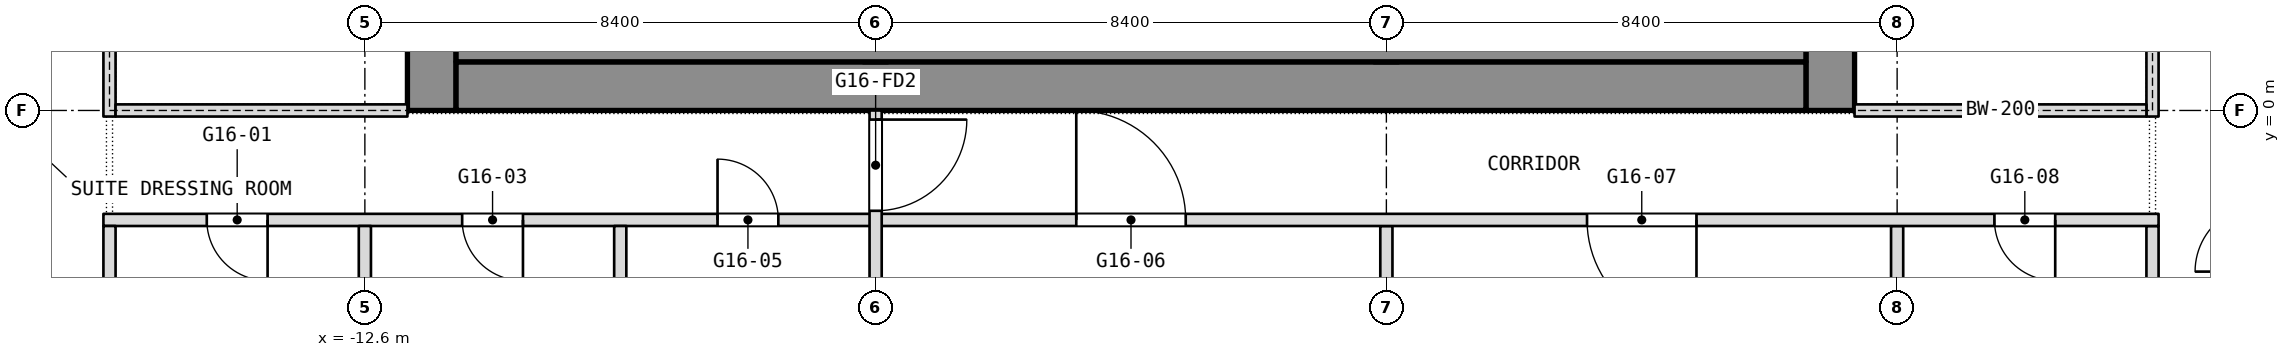
"""IFC4 building model, lengths in metres.
Left out: names, types, materials, properties, quantities, classifications, styles, units other than length and angle.
Written with IfcOpenShell. Run it as: python <this file> out.ifc"""

import sys

from ifc_helpers import new_model, si_unit, direction, frame, frame_2d, origin, place, context, subcontext, project, spatial, rectangle, extrude, element, fill, save


model = new_model("IFC4")
c1 = context("Model", 3, precision=1e-05, world=origin(), true_north=direction((0.0, 1.0)))
c2 = subcontext(c1, "Body", "Model", "MODEL_VIEW")
j1 = project(units=[si_unit("LENGTHUNIT", "METRE"), si_unit("PLANEANGLEUNIT", "RADIAN")], contexts=[c1])
p1 = place(None, origin())
s1 = spatial("IfcSite", under=j1, at=p1, CompositionType="ELEMENT")
p2 = place(p1, origin())
s2 = spatial("IfcBuilding", under=s1, at=p2, CompositionType="ELEMENT")
p3 = place(p2, frame((0.0, 0.0, 198.5)))
s3 = spatial("IfcBuildingStorey", under=s2, at=p3, CompositionType="ELEMENT", Elevation=198.5)
p4 = place(p3, frame((11.5, 0.0, 0.0), z_axis=(0.0, 0.0, 1.0), x_axis=(0.0, 1.0, 0.0)))
e1 = element("IfcWall", 1, at=p4, inside=s3, PredefinedType="SHEAR", context=c2, shape_type="SweptSolid", body=[
    extrude(rectangle(XDim=16.8, YDim=0.8, at=frame_2d((8.4, 0.0))), origin(), (0.0, 0.0, 1.0), 3.6),
])
p5 = place(p4, frame((2.3, 0.0, 0.0)))
e2 = element("IfcOpeningElement", 2, at=p5, cuts=e1, PredefinedType="OPENING", context=c2, shape_type="SweptSolid", body=[
    extrude(rectangle(XDim=1.1, YDim=2.1, at=frame_2d((0.55, 1.05))), frame((0.0, 0.4, 0.0), z_axis=(0.0, -1.0, 0.0), x_axis=(1.0, 0.0, 0.0)), (0.0, 0.0, 1.0), 0.8),
])
p6 = place(p4, frame((4.85, 0.0, 0.0)))
e3 = element("IfcOpeningElement", 3, at=p6, cuts=e1, PredefinedType="OPENING", context=c2, shape_type="SweptSolid", body=[
    extrude(rectangle(XDim=1.1, YDim=2.1, at=frame_2d((0.55, 1.05))), frame((0.0, 0.4, 0.0), z_axis=(0.0, -1.0, 0.0), x_axis=(1.0, 0.0, 0.0)), (0.0, 0.0, 1.0), 0.8),
])
p7 = place(p4, frame((6.825, 0.0, 0.0)))
e4 = element("IfcOpeningElement", 4, at=p7, cuts=e1, PredefinedType="OPENING", context=c2, shape_type="SweptSolid", body=[
    extrude(rectangle(XDim=1.2, YDim=2.1, at=frame_2d((0.6, 1.05))), frame((0.0, 0.4, 0.0), z_axis=(0.0, -1.0, 0.0), x_axis=(1.0, 0.0, 0.0)), (0.0, 0.0, 1.0), 0.8),
])
p8 = place(p4, frame((13.4, 0.0, 0.0)))
e5 = element("IfcOpeningElement", 5, at=p8, cuts=e1, PredefinedType="OPENING", context=c2, shape_type="SweptSolid", body=[
    extrude(rectangle(XDim=1.1, YDim=2.1, at=frame_2d((0.55, 1.05))), frame((0.0, 0.4, 0.0), z_axis=(0.0, -1.0, 0.0), x_axis=(1.0, 0.0, 0.0)), (0.0, 0.0, 1.0), 0.8),
])
p9 = place(p4, frame((10.85, 0.0, 0.0)))
e6 = element("IfcOpeningElement", 6, at=p9, cuts=e1, PredefinedType="OPENING", context=c2, shape_type="SweptSolid", body=[
    extrude(rectangle(XDim=1.1, YDim=2.1, at=frame_2d((0.55, 1.05))), frame((0.0, 0.4, 0.0), z_axis=(0.0, -1.0, 0.0), x_axis=(1.0, 0.0, 0.0)), (0.0, 0.0, 1.0), 0.8),
])
p10 = place(p4, frame((8.775, 0.0, 0.0)))
e7 = element("IfcOpeningElement", 7, at=p10, cuts=e1, PredefinedType="OPENING", context=c2, shape_type="SweptSolid", body=[
    extrude(rectangle(XDim=1.2, YDim=2.1, at=frame_2d((0.6, 1.05))), frame((0.0, 0.4, 0.0), z_axis=(0.0, -1.0, 0.0), x_axis=(1.0, 0.0, 0.0)), (0.0, 0.0, 1.0), 0.8),
])
p11 = place(p3, frame((-11.5, 0.0, 0.0), z_axis=(0.0, 0.0, 1.0), x_axis=(0.0, 1.0, 0.0)))
e8 = element("IfcWall", 8, at=p11, inside=s3, PredefinedType="SHEAR", context=c2, shape_type="SweptSolid", body=[
    extrude(rectangle(XDim=16.8, YDim=0.8, at=frame_2d((8.4, 0.0))), origin(), (0.0, 0.0, 1.0), 3.6),
])
p12 = place(p11, frame((1.837, 0.0, 0.0)))
e9 = element("IfcOpeningElement", 9, at=p12, cuts=e8, PredefinedType="OPENING", context=c2, shape_type="SweptSolid", body=[
    extrude(rectangle(XDim=0.9, YDim=2.1, at=frame_2d((0.45, 1.05))), frame((0.0, 0.4, 0.0), z_axis=(0.0, -1.0, 0.0), x_axis=(1.0, 0.0, 0.0)), (0.0, 0.0, 1.0), 0.8),
])
p13 = place(p11, frame((4.462, 0.0, 0.0)))
e10 = element("IfcOpeningElement", 10, at=p13, cuts=e8, PredefinedType="OPENING", context=c2, shape_type="SweptSolid", body=[
    extrude(rectangle(XDim=0.9, YDim=2.1, at=frame_2d((0.45, 1.05))), frame((0.0, 0.4, 0.0), z_axis=(0.0, -1.0, 0.0), x_axis=(1.0, 0.0, 0.0)), (0.0, 0.0, 1.0), 0.8),
])
p14 = place(p11, frame((6.825, 0.0, 0.0)))
e11 = element("IfcOpeningElement", 11, at=p14, cuts=e8, PredefinedType="OPENING", context=c2, shape_type="SweptSolid", body=[
    extrude(rectangle(XDim=1.2, YDim=2.1, at=frame_2d((0.6, 1.05))), frame((0.0, 0.4, 0.0), z_axis=(0.0, -1.0, 0.0), x_axis=(1.0, 0.0, 0.0)), (0.0, 0.0, 1.0), 0.8),
])
p15 = place(p11, frame((12.3, 0.0, 0.0)))
e12 = element("IfcOpeningElement", 12, at=p15, cuts=e8, PredefinedType="OPENING", context=c2, shape_type="SweptSolid", body=[
    extrude(rectangle(XDim=0.9, YDim=2.1, at=frame_2d((0.45, 1.05))), frame((0.0, 0.4, 0.0), z_axis=(0.0, -1.0, 0.0), x_axis=(1.0, 0.0, 0.0)), (0.0, 0.0, 1.0), 0.8),
])
p16 = place(p11, frame((8.775, 0.0, 0.0)))
e13 = element("IfcOpeningElement", 13, at=p16, cuts=e8, PredefinedType="OPENING", context=c2, shape_type="SweptSolid", body=[
    extrude(rectangle(XDim=1.2, YDim=2.1, at=frame_2d((0.6, 1.05))), frame((0.0, 0.4, 0.0), z_axis=(0.0, -1.0, 0.0), x_axis=(1.0, 0.0, 0.0)), (0.0, 0.0, 1.0), 0.8),
])
p17 = place(p3, frame((-11.1, 0.4, 0.0), z_axis=(0.0, 0.0, 1.0), x_axis=(1.0, 0.0, 0.0)))
e14 = element("IfcWall", 14, at=p17, inside=s3, PredefinedType="SHEAR", context=c2, shape_type="SweptSolid", body=[
    extrude(rectangle(XDim=22.2, YDim=0.8, at=frame_2d((11.1, 0.0))), origin(), (0.0, 0.0, 1.0), 3.6),
])
p18 = place(p3, frame((-4.2, 0.8, 0.0), z_axis=(0.0, 0.0, 1.0), x_axis=(0.0, 1.0, 0.0)))
e15 = element("IfcWall", 15, at=p18, inside=s3, PredefinedType="SHEAR", context=c2, shape_type="SweptSolid", body=[
    extrude(rectangle(XDim=15.2, YDim=0.4, at=frame_2d((7.6, 0.0))), origin(), (0.0, 0.0, 1.0), 3.6),
])
p19 = place(p18, frame((8.5, 0.0, 0.0)))
e16 = element("IfcOpeningElement", 16, at=p19, cuts=e15, PredefinedType="OPENING", context=c2, shape_type="SweptSolid", body=[
    extrude(rectangle(XDim=1.2, YDim=2.1, at=frame_2d((0.6, 1.05))), frame((0.0, 0.2, 0.0), z_axis=(0.0, -1.0, 0.0), x_axis=(1.0, 0.0, 0.0)), (0.0, 0.0, 1.0), 0.4),
])
p20 = place(p3, frame((4.2, 0.8, 0.0), z_axis=(0.0, 0.0, 1.0), x_axis=(0.0, 1.0, 0.0)))
e17 = element("IfcWall", 17, at=p20, inside=s3, PredefinedType="SHEAR", context=c2, shape_type="SweptSolid", body=[
    extrude(rectangle(XDim=15.2, YDim=0.4, at=frame_2d((7.6, 0.0))), origin(), (0.0, 0.0, 1.0), 3.6),
])
p21 = place(p20, frame((5.95, 0.0, 0.0)))
e18 = element("IfcOpeningElement", 18, at=p21, cuts=e17, PredefinedType="OPENING", context=c2, shape_type="SweptSolid", body=[
    extrude(rectangle(XDim=1.2, YDim=2.1, at=frame_2d((0.6, 1.05))), frame((0.0, 0.2, 0.0), z_axis=(0.0, -1.0, 0.0), x_axis=(1.0, 0.0, 0.0)), (0.0, 0.0, 1.0), 0.4),
])
for number, where, z_axis, x_axis in (
    (19, (16.8, -7.8, 0.0), (0.0, 0.0, 1.0), (0.0, 1.0, 0.0)),
    (20, (12.6, -7.8, 0.0), (0.0, 0.0, 1.0), (0.0, 1.0, 0.0)),
):
    element("IfcWall", number, at=place(p3, frame(where, z_axis=z_axis, x_axis=x_axis)), inside=s3, PredefinedType="PARTITIONING", context=c2, shape_type="SweptSolid", body=[
        extrude(rectangle(XDim=5.9, YDim=0.2, at=frame_2d((2.95, 0.0))), origin(), (0.0, 0.0, 1.0), 3.34),
    ])
p22 = place(p3, frame((4.2, -11.6, 0.0), z_axis=(0.0, 0.0, 1.0), x_axis=(0.0, 1.0, 0.0)))
e21 = element("IfcWall", 21, at=p22, inside=s3, PredefinedType="PARTITIONING", context=c2, shape_type="SweptSolid", body=[
    extrude(rectangle(XDim=9.7, YDim=0.2, at=frame_2d((4.85, 0.0))), origin(), (0.0, 0.0, 1.0), 3.34),
])
p23 = place(p3, frame((-16.9, -1.8, 0.0), z_axis=(0.0, 0.0, 1.0), x_axis=(1.0, 0.0, 0.0)))
e22 = element("IfcWall", 22, at=p23, inside=s3, PredefinedType="PARTITIONING", context=c2, shape_type="SweptSolid", body=[
    extrude(rectangle(XDim=33.8, YDim=0.2, at=frame_2d((16.9, 0.0))), origin(), (0.0, 0.0, 1.0), 3.34),
])
p24 = place(p23, frame((1.7, 0.0, 0.0)))
e23 = element("IfcOpeningElement", 23, at=p24, cuts=e22, PredefinedType="OPENING", context=c2, shape_type="SweptSolid", body=[
    extrude(rectangle(XDim=1.0, YDim=2.1, at=frame_2d((0.5, 1.05))), frame((0.0, 0.1, 0.0), z_axis=(0.0, -1.0, 0.0), x_axis=(1.0, 0.0, 0.0)), (0.0, 0.0, 1.0), 0.2),
])
p25 = place(p23, frame((5.9, 0.0, 0.0)))
e24 = element("IfcOpeningElement", 24, at=p25, cuts=e22, PredefinedType="OPENING", context=c2, shape_type="SweptSolid", body=[
    extrude(rectangle(XDim=1.0, YDim=2.1, at=frame_2d((0.5, 1.05))), frame((0.0, 0.1, 0.0), z_axis=(0.0, -1.0, 0.0), x_axis=(1.0, 0.0, 0.0)), (0.0, 0.0, 1.0), 0.2),
])
p26 = place(p23, frame((10.1, 0.0, 0.0)))
e25 = element("IfcOpeningElement", 25, at=p26, cuts=e22, PredefinedType="OPENING", context=c2, shape_type="SweptSolid", body=[
    extrude(rectangle(XDim=1.0, YDim=2.1, at=frame_2d((0.5, 1.05))), frame((0.0, 0.1, 0.0), z_axis=(0.0, -1.0, 0.0), x_axis=(1.0, 0.0, 0.0)), (0.0, 0.0, 1.0), 0.2),
])
p27 = place(p23, frame((16.0, 0.0, 0.0)))
e26 = element("IfcOpeningElement", 26, at=p27, cuts=e22, PredefinedType="OPENING", context=c2, shape_type="SweptSolid", body=[
    extrude(rectangle(XDim=1.8, YDim=2.1, at=frame_2d((0.9, 1.05))), frame((0.0, 0.1, 0.0), z_axis=(0.0, -1.0, 0.0), x_axis=(1.0, 0.0, 0.0)), (0.0, 0.0, 1.0), 0.2),
])
p28 = place(p23, frame((24.4, 0.0, 0.0)))
e27 = element("IfcOpeningElement", 27, at=p28, cuts=e22, PredefinedType="OPENING", context=c2, shape_type="SweptSolid", body=[
    extrude(rectangle(XDim=1.8, YDim=2.1, at=frame_2d((0.9, 1.05))), frame((0.0, 0.1, 0.0), z_axis=(0.0, -1.0, 0.0), x_axis=(1.0, 0.0, 0.0)), (0.0, 0.0, 1.0), 0.2),
])
p29 = place(p23, frame((31.1, 0.0, 0.0)))
e28 = element("IfcOpeningElement", 28, at=p29, cuts=e22, PredefinedType="OPENING", context=c2, shape_type="SweptSolid", body=[
    extrude(rectangle(XDim=1.0, YDim=2.1, at=frame_2d((0.5, 1.05))), frame((0.0, 0.1, 0.0), z_axis=(0.0, -1.0, 0.0), x_axis=(1.0, 0.0, 0.0)), (0.0, 0.0, 1.0), 0.2),
])
p30 = place(p3, frame((-4.2, -13.6, 0.0), z_axis=(0.0, 0.0, 1.0), x_axis=(0.0, 1.0, 0.0)))
e29 = element("IfcWall", 29, at=p30, inside=s3, PredefinedType="PARTITIONING", context=c2, shape_type="SweptSolid", body=[
    extrude(rectangle(XDim=13.6, YDim=0.2, at=frame_2d((6.8, 0.0))), origin(), (0.0, 0.0, 1.0), 3.34),
])
p31 = place(p30, frame((11.95, 0.0, 0.0)))
e30 = element("IfcOpeningElement", 30, at=p31, cuts=e29, PredefinedType="OPENING", context=c2, shape_type="SweptSolid", body=[
    extrude(rectangle(XDim=1.5, YDim=2.1, at=frame_2d((0.75, 1.05))), frame((0.0, 0.1, 0.0), z_axis=(0.0, -1.0, 0.0), x_axis=(1.0, 0.0, 0.0)), (0.0, 0.0, 1.0), 0.2),
])
p32 = place(p30, frame((0.25, 0.0, 0.0)))
e31 = element("IfcOpeningElement", 31, at=p32, cuts=e29, PredefinedType="OPENING", context=c2, shape_type="SweptSolid", body=[
    extrude(rectangle(XDim=1.5, YDim=2.1, at=frame_2d((0.75, 1.05))), frame((0.0, 0.1, 0.0), z_axis=(0.0, -1.0, 0.0), x_axis=(1.0, 0.0, 0.0)), (0.0, 0.0, 1.0), 0.2),
])
p33 = place(p3, frame((-8.4, -8.0, 0.0), z_axis=(0.0, 0.0, 1.0), x_axis=(0.0, 1.0, 0.0)))
e32 = element("IfcWall", 32, at=p33, inside=s3, PredefinedType="PARTITIONING", context=c2, shape_type="SweptSolid", body=[
    extrude(rectangle(XDim=6.1, YDim=0.2, at=frame_2d((3.05, 0.0))), origin(), (0.0, 0.0, 1.0), 3.34),
])
p34 = place(p3, frame((-12.6, -7.8, 0.0), z_axis=(0.0, 0.0, 1.0), x_axis=(0.0, 1.0, 0.0)))
e33 = element("IfcWall", 33, at=p34, inside=s3, PredefinedType="PARTITIONING", context=c2, shape_type="SweptSolid", body=[
    extrude(rectangle(XDim=5.9, YDim=0.2, at=frame_2d((2.95, 0.0))), origin(), (0.0, 0.0, 1.0), 3.34),
])
p35 = place(p3, frame((-16.8, -8.0, 0.0), z_axis=(0.0, 0.0, 1.0), x_axis=(0.0, 1.0, 0.0)))
e34 = element("IfcWall", 34, at=p35, inside=s3, PredefinedType="PARTITIONING", context=c2, shape_type="SweptSolid", body=[
    extrude(rectangle(XDim=6.1, YDim=0.2, at=frame_2d((3.05, 0.0))), origin(), (0.0, 0.0, 1.0), 3.34),
])
p36 = place(p3, frame((-11.1, 1.15, 0.0), z_axis=(0.0, 0.0, 1.0), x_axis=(1.0, 0.0, 0.0)))
e35 = element("IfcWall", 35, at=p36, inside=s3, PredefinedType="PARTITIONING", context=c2, shape_type="SweptSolid", body=[
    extrude(rectangle(XDim=22.2, YDim=0.7, at=frame_2d((11.1, 0.0))), origin(), (0.0, 0.0, 1.0), 3.34),
])
p37 = place(p3, frame((-16.8, -0.1, 0.0), z_axis=(0.0, 0.0, 1.0), x_axis=(0.0, 1.0, 0.0)))
e36 = element("IfcWall", 36, at=p37, inside=s3, PredefinedType="PARTITIONING", context=c2, shape_type="SweptSolid", body=[
    extrude(rectangle(XDim=17.0, YDim=0.2, at=frame_2d((8.5, 0.0))), origin(), (0.0, 0.0, 1.0), 3.34),
])
p38 = place(p37, frame((2.2, 0.0, 0.0)))
e37 = element("IfcOpeningElement", 37, at=p38, cuts=e36, PredefinedType="OPENING", context=c2, shape_type="SweptSolid", body=[
    extrude(rectangle(XDim=1.8, YDim=2.1, at=frame_2d((0.9, 1.05))), frame((0.0, 0.1, 0.0), z_axis=(0.0, -1.0, 0.0), x_axis=(1.0, 0.0, 0.0)), (0.0, 0.0, 1.0), 0.2),
])
p39 = place(p37, frame((13.0, 0.0, 0.0)))
e38 = element("IfcOpeningElement", 38, at=p39, cuts=e36, PredefinedType="OPENING", context=c2, shape_type="SweptSolid", body=[
    extrude(rectangle(XDim=1.8, YDim=2.1, at=frame_2d((0.9, 1.05))), frame((0.0, 0.1, 0.0), z_axis=(0.0, -1.0, 0.0), x_axis=(1.0, 0.0, 0.0)), (0.0, 0.0, 1.0), 0.2),
])
p40 = place(p3, frame((-16.7, 0.0, 0.0), z_axis=(0.0, 0.0, 1.0), x_axis=(1.0, 0.0, 0.0)))
e39 = element("IfcWall", 39, at=p40, inside=s3, PredefinedType="PARTITIONING", context=c2, shape_type="SweptSolid", body=[
    extrude(rectangle(XDim=4.8, YDim=0.2, at=frame_2d((2.4, 0.0))), origin(), (0.0, 0.0, 1.0), 2.94),
])
p41 = place(p3, frame((16.8, -0.1, 0.0), z_axis=(0.0, 0.0, 1.0), x_axis=(0.0, 1.0, 0.0)))
e40 = element("IfcWall", 40, at=p41, inside=s3, PredefinedType="PARTITIONING", context=c2, shape_type="SweptSolid", body=[
    extrude(rectangle(XDim=17.0, YDim=0.2, at=frame_2d((8.5, 0.0))), origin(), (0.0, 0.0, 1.0), 3.34),
])
p42 = place(p41, frame((2.2, 0.0, 0.0)))
e41 = element("IfcOpeningElement", 41, at=p42, cuts=e40, PredefinedType="OPENING", context=c2, shape_type="SweptSolid", body=[
    extrude(rectangle(XDim=1.8, YDim=2.1, at=frame_2d((0.9, 1.05))), frame((0.0, 0.1, 0.0), z_axis=(0.0, -1.0, 0.0), x_axis=(1.0, 0.0, 0.0)), (0.0, 0.0, 1.0), 0.2),
])
p43 = place(p41, frame((13.0, 0.0, 0.0)))
e42 = element("IfcOpeningElement", 42, at=p43, cuts=e40, PredefinedType="OPENING", context=c2, shape_type="SweptSolid", body=[
    extrude(rectangle(XDim=1.8, YDim=2.1, at=frame_2d((0.9, 1.05))), frame((0.0, 0.1, 0.0), z_axis=(0.0, -1.0, 0.0), x_axis=(1.0, 0.0, 0.0)), (0.0, 0.0, 1.0), 0.2),
])
p44 = place(p3, frame((11.9, 0.0, 0.0), z_axis=(0.0, 0.0, 1.0), x_axis=(1.0, 0.0, 0.0)))
e43 = element("IfcWall", 43, at=p44, inside=s3, PredefinedType="PARTITIONING", context=c2, shape_type="SweptSolid", body=[
    extrude(rectangle(XDim=4.8, YDim=0.2, at=frame_2d((2.4, 0.0))), origin(), (0.0, 0.0, 1.0), 2.94),
])
p45 = place(p24, origin())
e44 = element("IfcDoor", 44, at=p45, inside=s3, OperationType="SINGLE_SWING_LEFT", PredefinedType="DOOR", context=c2, shape_type="SweptSolid", body=[
    extrude(rectangle(XDim=1.0, YDim=2.1, at=frame_2d((0.5, 1.05))), frame((0.0, 0.025, 0.0), z_axis=(0.0, -1.0, 0.0), x_axis=(1.0, 0.0, 0.0)), (0.0, 0.0, 1.0), 0.05),
])
fill(e23, e44)
p46 = place(p25, origin())
e45 = element("IfcDoor", 45, at=p46, inside=s3, OperationType="SINGLE_SWING_LEFT", PredefinedType="DOOR", context=c2, shape_type="SweptSolid", body=[
    extrude(rectangle(XDim=1.0, YDim=2.1, at=frame_2d((0.5, 1.05))), frame((0.0, 0.025, 0.0), z_axis=(0.0, -1.0, 0.0), x_axis=(1.0, 0.0, 0.0)), (0.0, 0.0, 1.0), 0.05),
])
fill(e24, e45)
p47 = place(p26, origin())
e46 = element("IfcDoor", 46, at=p47, inside=s3, OperationType="SINGLE_SWING_RIGHT", PredefinedType="DOOR", context=c2, shape_type="SweptSolid", body=[
    extrude(rectangle(XDim=1.0, YDim=2.1, at=frame_2d((0.5, 1.05))), frame((0.0, 0.025, 0.0), z_axis=(0.0, -1.0, 0.0), x_axis=(1.0, 0.0, 0.0)), (0.0, 0.0, 1.0), 0.05),
])
fill(e25, e46)
p48 = place(p27, origin())
e47 = element("IfcDoor", 47, at=p48, inside=s3, OperationType="DOUBLE_DOOR_SINGLE_SWING", PredefinedType="DOOR", context=c2, shape_type="SweptSolid", body=[
    extrude(rectangle(XDim=1.8, YDim=2.1, at=frame_2d((0.9, 1.05))), frame((0.0, 0.025, 0.0), z_axis=(0.0, -1.0, 0.0), x_axis=(1.0, 0.0, 0.0)), (0.0, 0.0, 1.0), 0.05),
])
fill(e26, e47)
p49 = place(p28, origin())
e48 = element("IfcDoor", 48, at=p49, inside=s3, OperationType="DOUBLE_DOOR_SINGLE_SWING", PredefinedType="DOOR", context=c2, shape_type="SweptSolid", body=[
    extrude(rectangle(XDim=1.8, YDim=2.1, at=frame_2d((0.9, 1.05))), frame((0.0, 0.025, 0.0), z_axis=(0.0, -1.0, 0.0), x_axis=(1.0, 0.0, 0.0)), (0.0, 0.0, 1.0), 0.05),
])
fill(e27, e48)
p50 = place(p29, origin())
e49 = element("IfcDoor", 49, at=p50, inside=s3, OperationType="SINGLE_SWING_LEFT", PredefinedType="DOOR", context=c2, shape_type="SweptSolid", body=[
    extrude(rectangle(XDim=1.0, YDim=2.1, at=frame_2d((0.5, 1.05))), frame((0.0, 0.025, 0.0), z_axis=(0.0, -1.0, 0.0), x_axis=(1.0, 0.0, 0.0)), (0.0, 0.0, 1.0), 0.05),
])
fill(e28, e49)
p51 = place(p31, origin())
e50 = element("IfcDoor", 50, at=p51, inside=s3, OperationType="DOUBLE_DOOR_DOUBLE_SWING", PredefinedType="DOOR", context=c2, shape_type="SweptSolid", body=[
    extrude(rectangle(XDim=1.5, YDim=2.1, at=frame_2d((0.75, 1.05))), frame((0.0, 0.025, 0.0), z_axis=(0.0, -1.0, 0.0), x_axis=(1.0, 0.0, 0.0)), (0.0, 0.0, 1.0), 0.05),
])
fill(e30, e50)
save(model, sys.argv[1])
